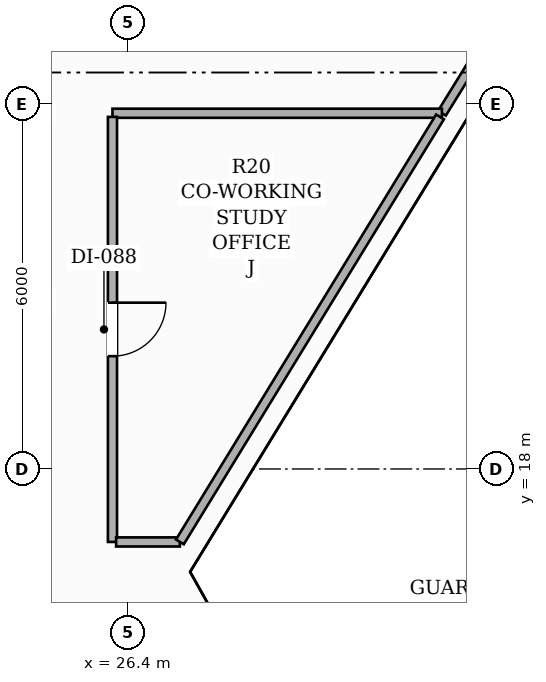
"""IFC4 building model, lengths in metres.
Left out: names, types, materials, properties, quantities, classifications, styles, units other than length and angle.
Written with IfcOpenShell. Run it as: python <this file> out.ifc"""

import sys

from ifc_helpers import new_model, si_unit, direction, frame, frame_2d, origin, place, context, subcontext, project, spatial, rectangle, extrude, element, fill, save


model = new_model("IFC4")
c1 = context("Model", 3, precision=1e-05, world=origin(), true_north=direction((0.0, 1.0)))
c2 = subcontext(c1, "Body", "Model", "MODEL_VIEW")
j1 = project(units=[si_unit("LENGTHUNIT", "METRE"), si_unit("PLANEANGLEUNIT", "RADIAN")], contexts=[c1])
p1 = place(None, origin())
s1 = spatial("IfcSite", under=j1, at=p1, CompositionType="ELEMENT")
p2 = place(p1, origin())
s2 = spatial("IfcBuilding", under=s1, at=p2, CompositionType="ELEMENT")
p3 = place(p2, frame((0.0, 0.0, 50.0)))
s3 = spatial("IfcBuildingStorey", under=s2, at=p3, CompositionType="ELEMENT", Elevation=50.0)
p4 = place(p3, frame((32.129, 24.758, 0.0), z_axis=(0.0, 0.0, 1.0), x_axis=(-0.525488010188, -0.850801005611, 0.0)))
e1 = element("IfcWall", 1, at=p4, inside=s3, PredefinedType="PARTITIONING", context=c2, shape_type="SweptSolid", body=[
    extrude(rectangle(XDim=1.067, YDim=0.15, at=frame_2d((0.534, 0.0))), origin(), (0.0, 0.0, 1.0), 3.06),
])
p5 = place(p3, frame((31.568, 23.85, 0.0), z_axis=(0.0, 0.0, 1.0), x_axis=(-1.0, 0.0, 0.0)))
e2 = element("IfcWall", 2, at=p5, inside=s3, PredefinedType="PARTITIONING", context=c2, shape_type="SweptSolid", body=[
    extrude(rectangle(XDim=5.418, YDim=0.15, at=frame_2d((2.709, 0.0))), origin(), (0.0, 0.0, 1.0), 2.669),
])
p6 = place(p3, frame((26.15, 23.79, 0.0), z_axis=(0.0, 0.0, 1.0), x_axis=(0.0, -1.0, 0.0)))
e3 = element("IfcWall", 3, at=p6, inside=s3, PredefinedType="PARTITIONING", context=c2, shape_type="SweptSolid", body=[
    extrude(rectangle(XDim=6.99, YDim=0.15, at=frame_2d((3.495, 0.0))), origin(), (0.0, 0.0, 1.0), 2.669),
])
p7 = place(p6, frame((3.055, 0.0, 0.0)))
e4 = element("IfcOpeningElement", 4, at=p7, cuts=e3, PredefinedType="OPENING", context=c2, shape_type="SweptSolid", body=[
    extrude(rectangle(XDim=0.88, YDim=2.1, at=frame_2d((0.44, 1.05))), frame((0.0, 0.085, 0.0), z_axis=(0.0, -1.0, 0.0), x_axis=(1.0, 0.0, 0.0)), (0.0, 0.0, 1.0), 0.17),
])
p8 = place(p3, frame((26.21, 16.8, 0.0), z_axis=(0.0, 0.0, 1.0), x_axis=(1.0, 0.0, 0.0)))
e5 = element("IfcWall", 5, at=p8, inside=s3, PredefinedType="PARTITIONING", context=c2, shape_type="SweptSolid", body=[
    extrude(rectangle(XDim=1.049, YDim=0.15, at=frame_2d((0.524, 0.0))), origin(), (0.0, 0.0, 1.0), 3.06),
])
p9 = place(p3, frame((27.259, 16.801, 0.0), z_axis=(0.0, 0.0, 1.0), x_axis=(0.522072924527, 0.852900850906, 0.0)))
e6 = element("IfcWall", 6, at=p9, inside=s3, PredefinedType="PARTITIONING", context=c2, shape_type="SweptSolid", body=[
    extrude(rectangle(XDim=8.194, YDim=0.15, at=frame_2d((4.097, 0.0))), origin(), (0.0, 0.0, 1.0), 2.669),
])
p10 = place(p7, origin())
e7 = element("IfcDoor", 7, at=p10, inside=s3, OperationType="SINGLE_SWING_LEFT", PredefinedType="DOOR", context=c2, shape_type="SweptSolid", body=[
    extrude(rectangle(XDim=0.88, YDim=2.1, at=frame_2d((0.44, 1.05))), frame((0.0, 0.025, 0.0), z_axis=(0.0, -1.0, 0.0), x_axis=(1.0, 0.0, 0.0)), (0.0, 0.0, 1.0), 0.05),
])
fill(e4, e7)
save(model, sys.argv[1])
